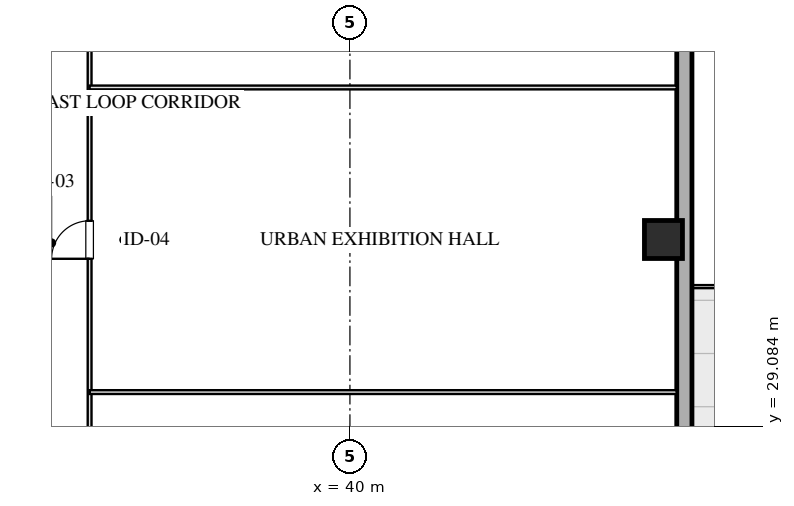
"""IFC4 building model, lengths in metres.
Left out: names, types, materials, properties, quantities, classifications, styles, units other than length and angle.
Written with IfcOpenShell. Run it as: python <this file> out.ifc"""

import sys

from ifc_helpers import new_model, si_unit, direction, frame, frame_2d, origin, origin_2d, place, context, subcontext, project, spatial, rectangle, hollow_rectangle, extrude, element, fill, save


model = new_model("IFC4")
c1 = context("Model", 3, precision=1e-05, world=origin(), true_north=direction((0.0, 1.0)))
c2 = subcontext(c1, "Body", "Model", "MODEL_VIEW")
j1 = project(units=[si_unit("LENGTHUNIT", "METRE"), si_unit("PLANEANGLEUNIT", "RADIAN")], contexts=[c1])
p1 = place(None, origin())
s1 = spatial("IfcSite", under=j1, at=p1, CompositionType="ELEMENT")
p2 = place(p1, origin())
s2 = spatial("IfcBuilding", under=s1, at=p2, CompositionType="ELEMENT")
p3 = place(p2, frame((0.0, 0.0, 146.05)))
s3 = spatial("IfcBuildingStorey", under=s2, at=p3, CompositionType="ELEMENT", Elevation=146.05)
p4 = place(p3, frame((48.25, 34.0, 0.0), z_axis=(0.0, 0.0, 1.0), x_axis=(1.0, 0.0, 0.0)))
e1 = element("IfcColumn", 1, at=p4, inside=s3, PredefinedType="COLUMN", context=c2, shape_type="SweptSolid", body=[
    extrude(hollow_rectangle(XDim=1.0, YDim=1.0, WallThickness=0.036, at=origin_2d()), origin(), (0.0, 0.0, 1.0), 3.451),
])
p5 = place(p3, frame((48.8, 59.0, 0.0), z_axis=(0.0, 0.0, 1.0), x_axis=(0.0, -1.0, 0.0)))
e2 = element("IfcWall", 2, at=p5, inside=s3, PredefinedType="SOLIDWALL", context=c2, shape_type="SweptSolid", body=[
    extrude(rectangle(XDim=50.0, YDim=0.4, at=frame_2d((25.0, 0.0))), origin(), (0.0, 0.0, 1.0), 2.61),
])
p6 = place(p5, frame((17.475, 0.0, 0.75)))
e3 = element("IfcOpeningElement", 3, at=p6, cuts=e2, PredefinedType="OPENING", context=c2, shape_type="SweptSolid", body=[
    extrude(rectangle(XDim=2.25, YDim=1.46, at=frame_2d((1.125, 0.73))), frame((0.0, 0.21, 0.0), z_axis=(0.0, -1.0, 0.0), x_axis=(1.0, 0.0, 0.0)), (0.0, 0.0, 1.0), 0.42),
])
p7 = place(p5, frame((30.258, 0.0, 0.0)))
e4 = element("IfcOpeningElement", 4, at=p7, cuts=e2, PredefinedType="OPENING", context=c2, shape_type="SweptSolid", body=[
    extrude(rectangle(XDim=1.1, YDim=2.15, at=frame_2d((0.55, 1.075))), frame((0.0, 0.21, 0.0), z_axis=(0.0, -1.0, 0.0), x_axis=(1.0, 0.0, 0.0)), (0.0, 0.0, 1.0), 0.42),
])
p8 = place(p3, frame((33.15, 23.65, 0.0), z_axis=(0.0, 0.0, 1.0), x_axis=(0.0, 1.0, 0.0)))
e5 = element("IfcWall", 5, at=p8, inside=s3, PredefinedType="MOVABLE", context=c2, shape_type="SweptSolid", body=[
    extrude(rectangle(XDim=20.7, YDim=0.1, at=frame_2d((10.35, 0.0))), origin(), (0.0, 0.0, 1.0), 3.175),
])
p9 = place(p8, frame((2.667, 0.0, 0.0)))
e6 = element("IfcOpeningElement", 6, at=p9, cuts=e5, PredefinedType="OPENING", context=c2, shape_type="SweptSolid", body=[
    extrude(rectangle(XDim=1.0, YDim=2.05, at=frame_2d((0.5, 1.025))), frame((0.0, 0.06, 0.0), z_axis=(0.0, -1.0, 0.0), x_axis=(1.0, 0.0, 0.0)), (0.0, 0.0, 1.0), 0.12),
])
p10 = place(p8, frame((9.843, 0.0, 0.0)))
e7 = element("IfcOpeningElement", 7, at=p10, cuts=e5, PredefinedType="OPENING", context=c2, shape_type="SweptSolid", body=[
    extrude(rectangle(XDim=1.0, YDim=2.05, at=frame_2d((0.5, 1.025))), frame((0.0, 0.06, 0.0), z_axis=(0.0, -1.0, 0.0), x_axis=(1.0, 0.0, 0.0)), (0.0, 0.0, 1.0), 0.12),
])
p11 = place(p8, frame((17.025, 0.0, 0.0)))
e8 = element("IfcOpeningElement", 8, at=p11, cuts=e5, PredefinedType="OPENING", context=c2, shape_type="SweptSolid", body=[
    extrude(rectangle(XDim=0.85, YDim=2.05, at=frame_2d((0.425, 1.025))), frame((0.0, 0.06, 0.0), z_axis=(0.0, -1.0, 0.0), x_axis=(1.0, 0.0, 0.0)), (0.0, 0.0, 1.0), 0.12),
])
for number, where, z_axis, x_axis in (
    (9, (33.15, 29.985, 0.0), (0.0, 0.0, 1.0), (1.0, 0.0, 0.0)),
    (10, (33.15, 38.0, 0.0), (0.0, 0.0, 1.0), (1.0, 0.0, 0.0)),
):
    element("IfcWall", number, at=place(p3, frame(where, z_axis=z_axis, x_axis=x_axis)), inside=s3, PredefinedType="MOVABLE", context=c2, shape_type="SweptSolid", body=[
        extrude(rectangle(XDim=15.45, YDim=0.1, at=frame_2d((7.725, 0.0))), origin(), (0.0, 0.0, 1.0), 3.175),
    ])
p12 = place(p10, origin())
e11 = element("IfcDoor", 11, at=p12, inside=s3, OperationType="SINGLE_SWING_LEFT", PredefinedType="DOOR", context=c2, shape_type="SweptSolid", body=[
    extrude(rectangle(XDim=1.0, YDim=2.05, at=frame_2d((0.5, 1.025))), frame((0.0, 0.025, 0.0), z_axis=(0.0, -1.0, 0.0), x_axis=(1.0, 0.0, 0.0)), (0.0, 0.0, 1.0), 0.05),
])
fill(e7, e11)
save(model, sys.argv[1])
